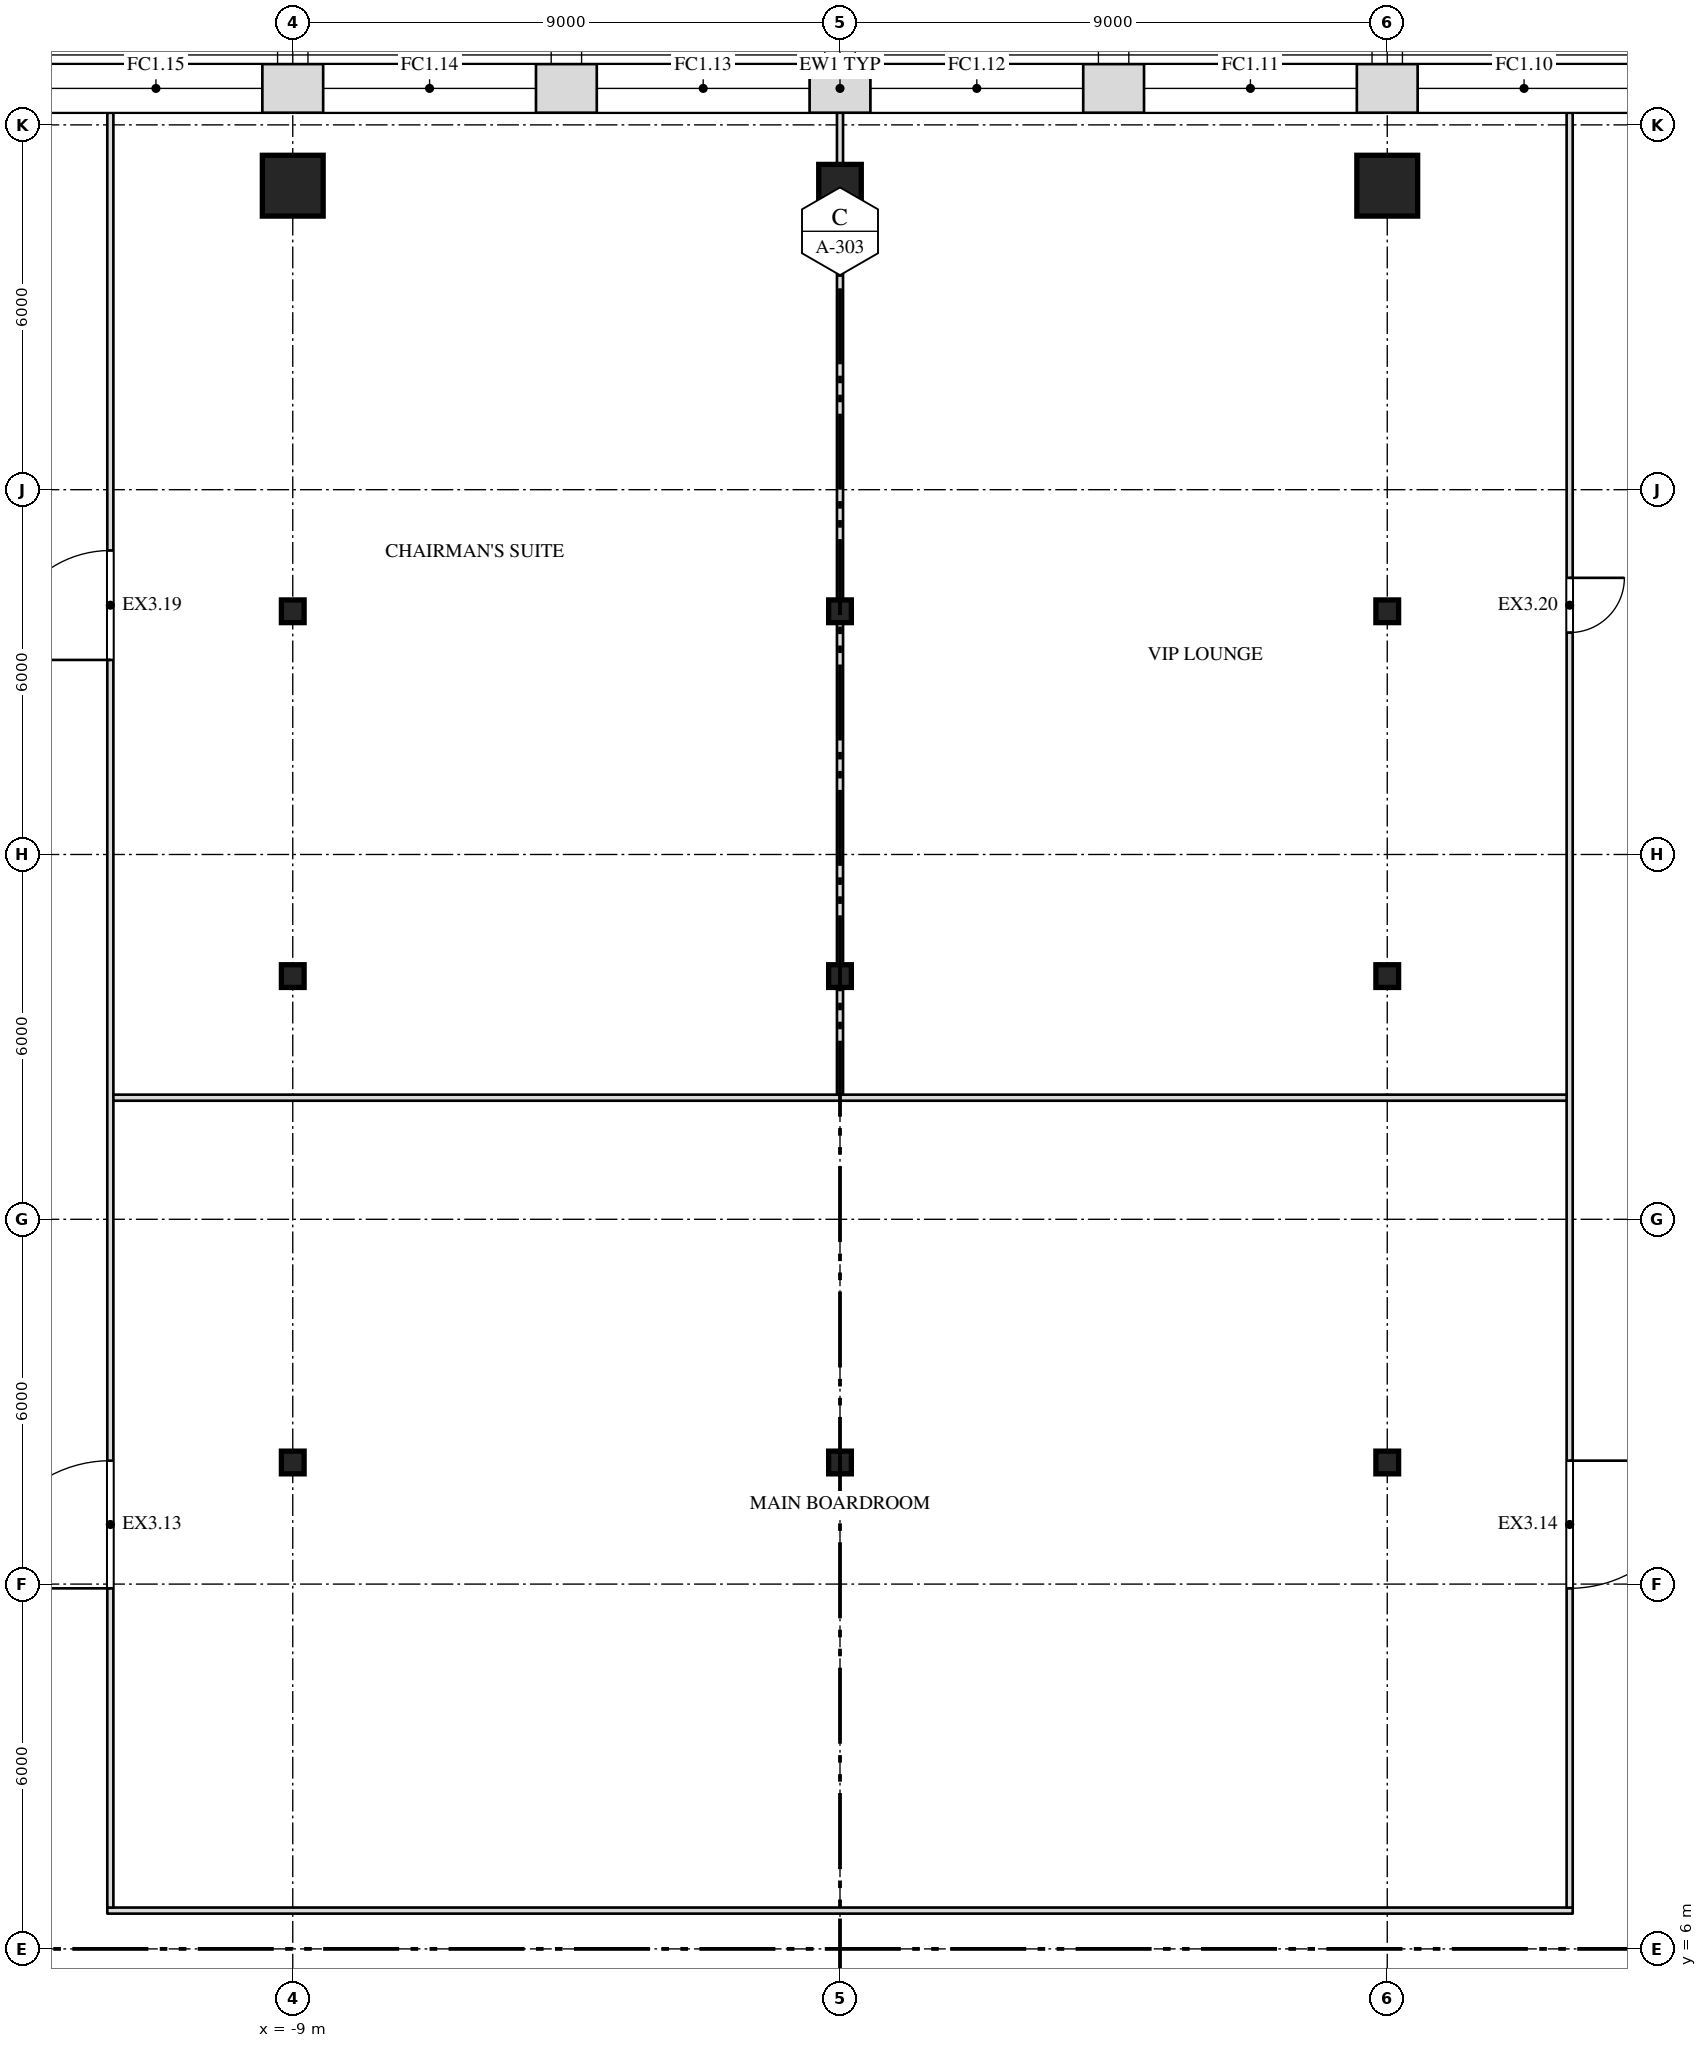
"""IFC4 building model, lengths in metres.
Left out: names, types, materials, properties, quantities, classifications, styles, units other than length and angle.
Written with IfcOpenShell. Run it as: python <this file> out.ifc"""

import sys

from ifc_helpers import new_model, si_unit, direction, frame, frame_2d, origin, origin_2d, place, context, subcontext, project, spatial, rectangle, i_section, extrude, element, fill, save


model = new_model("IFC4")
c1 = context("Model", 3, precision=1e-05, world=origin(), true_north=direction((0.0, 1.0)))
c2 = subcontext(c1, "Body", "Model", "MODEL_VIEW")
j1 = project(units=[si_unit("LENGTHUNIT", "METRE"), si_unit("PLANEANGLEUNIT", "RADIAN")], contexts=[c1])
p1 = place(None, origin())
s1 = spatial("IfcSite", under=j1, at=p1, CompositionType="ELEMENT")
p2 = place(p1, origin())
s2 = spatial("IfcBuilding", under=s1, at=p2, CompositionType="ELEMENT")
p3 = place(p2, frame((0.0, 0.0, 280.5)))
s3 = spatial("IfcBuildingStorey", under=s2, at=p3, CompositionType="ELEMENT", Elevation=280.5)
for number, where, z_axis, x_axis in (
    (1, (-9.0, 14.0, 0.0), (0.0, 0.0, 1.0), (1.0, 0.0, 0.0)),
    (2, (0.0, 14.0, 0.0), (0.0, 0.0, 1.0), (1.0, 0.0, 0.0)),
    (3, (9.0, 14.0, 0.0), (0.0, 0.0, 1.0), (1.0, 0.0, 0.0)),
    (4, (-9.0, 22.0, 0.0), (0.0, 0.0, 1.0), (1.0, 0.0, 0.0)),
    (5, (0.0, 22.0, 0.0), (0.0, 0.0, 1.0), (1.0, 0.0, 0.0)),
    (6, (9.0, 22.0, 0.0), (0.0, 0.0, 1.0), (1.0, 0.0, 0.0)),
    (7, (-9.0, 28.0, 0.0), (0.0, 0.0, 1.0), (1.0, 0.0, 0.0)),
    (8, (0.0, 28.0, 0.0), (0.0, 0.0, 1.0), (1.0, 0.0, 0.0)),
    (9, (9.0, 28.0, 0.0), (0.0, 0.0, 1.0), (1.0, 0.0, 0.0)),
):
    element("IfcColumn", number, at=place(p3, frame(where, z_axis=z_axis, x_axis=x_axis)), inside=s3, PredefinedType="COLUMN", context=c2, shape_type="SweptSolid", body=[
        extrude(i_section(OverallWidth=0.373, OverallDepth=0.373, WebThickness=0.016, FlangeThickness=0.026, at=origin_2d()), origin(), (0.0, 0.0, 1.0), 4.0),
    ])
p4 = place(p3, frame((-9.0, 35.0, 0.0), z_axis=(0.0, 0.0, 1.0), x_axis=(1.0, 0.0, 0.0)))
e10 = element("IfcColumn", 10, at=p4, inside=s3, PredefinedType="COLUMN", context=c2, shape_type="SweptSolid", body=[
    extrude(rectangle(XDim=1.0, YDim=1.0, at=origin_2d()), origin(), (0.0, 0.0, 1.0), 4.0),
])
p5 = place(p3, frame((0.0, 35.0, 0.0), z_axis=(0.0, 0.0, 1.0), x_axis=(1.0, 0.0, 0.0)))
e11 = element("IfcColumn", 11, at=p5, inside=s3, PredefinedType="COLUMN", context=c2, shape_type="SweptSolid", body=[
    extrude(rectangle(XDim=0.7, YDim=0.7, at=origin_2d()), origin(), (0.0, 0.0, 1.0), 4.0),
])
p6 = place(p3, frame((9.0, 35.0, 0.0), z_axis=(0.0, 0.0, 1.0), x_axis=(1.0, 0.0, 0.0)))
e12 = element("IfcColumn", 12, at=p6, inside=s3, PredefinedType="COLUMN", context=c2, shape_type="SweptSolid", body=[
    extrude(rectangle(XDim=1.0, YDim=1.0, at=origin_2d()), origin(), (0.0, 0.0, 1.0), 4.0),
])
p7 = place(p3, frame((-12.05, 6.63, 0.0), z_axis=(0.0, 0.0, 1.0), x_axis=(1.0, 0.0, 0.0)))
e13 = element("IfcWall", 13, at=p7, inside=s3, PredefinedType="PARTITIONING", context=c2, shape_type="SweptSolid", body=[
    extrude(rectangle(XDim=24.1, YDim=0.1, at=frame_2d((12.05, 0.0))), origin(), (0.0, 0.0, 1.0), 3.78),
])
p8 = place(p3, frame((-12.0, 6.68, 0.0), z_axis=(0.0, 0.0, 1.0), x_axis=(0.0, 1.0, 0.0)))
e14 = element("IfcWall", 14, at=p8, inside=s3, PredefinedType="PARTITIONING", context=c2, shape_type="SweptSolid", body=[
    extrude(rectangle(XDim=29.52, YDim=0.1, at=frame_2d((14.76, 0.0))), origin(), (0.0, 0.0, 1.0), 3.78),
])
p9 = place(p8, frame((5.25, 0.0, 0.0)))
e15 = element("IfcOpeningElement", 15, at=p9, cuts=e14, PredefinedType="OPENING", context=c2, shape_type="SweptSolid", body=[
    extrude(rectangle(XDim=2.1, YDim=2.4, at=frame_2d((1.05, 1.2))), frame((0.0, 0.062, 0.0), z_axis=(0.0, -1.0, 0.0), x_axis=(1.0, 0.0, 0.0)), (0.0, 0.0, 1.0), 0.124),
])
p10 = place(p8, frame((20.52, 0.0, 0.0)))
e16 = element("IfcOpeningElement", 16, at=p10, cuts=e14, PredefinedType="OPENING", context=c2, shape_type="SweptSolid", body=[
    extrude(rectangle(XDim=1.8, YDim=2.1, at=frame_2d((0.9, 1.05))), frame((0.0, 0.062, 0.0), z_axis=(0.0, -1.0, 0.0), x_axis=(1.0, 0.0, 0.0)), (0.0, 0.0, 1.0), 0.124),
])
p11 = place(p3, frame((12.0, 6.68, 0.0), z_axis=(0.0, 0.0, 1.0), x_axis=(0.0, 1.0, 0.0)))
e17 = element("IfcWall", 17, at=p11, inside=s3, PredefinedType="PARTITIONING", context=c2, shape_type="SweptSolid", body=[
    extrude(rectangle(XDim=29.52, YDim=0.1, at=frame_2d((14.76, 0.0))), origin(), (0.0, 0.0, 1.0), 3.78),
])
p12 = place(p11, frame((5.25, 0.0, 0.0)))
e18 = element("IfcOpeningElement", 18, at=p12, cuts=e17, PredefinedType="OPENING", context=c2, shape_type="SweptSolid", body=[
    extrude(rectangle(XDim=2.1, YDim=2.4, at=frame_2d((1.05, 1.2))), frame((0.0, 0.062, 0.0), z_axis=(0.0, -1.0, 0.0), x_axis=(1.0, 0.0, 0.0)), (0.0, 0.0, 1.0), 0.124),
])
p13 = place(p11, frame((20.97, 0.0, 0.0)))
e19 = element("IfcOpeningElement", 19, at=p13, cuts=e17, PredefinedType="OPENING", context=c2, shape_type="SweptSolid", body=[
    extrude(rectangle(XDim=0.9, YDim=2.1, at=frame_2d((0.45, 1.05))), frame((0.0, 0.062, 0.0), z_axis=(0.0, -1.0, 0.0), x_axis=(1.0, 0.0, 0.0)), (0.0, 0.0, 1.0), 0.124),
])
p14 = place(p3, frame((-11.95, 20.0, 0.0), z_axis=(0.0, 0.0, 1.0), x_axis=(1.0, 0.0, 0.0)))
e20 = element("IfcWall", 20, at=p14, inside=s3, PredefinedType="PARTITIONING", context=c2, shape_type="SweptSolid", body=[
    extrude(rectangle(XDim=23.9, YDim=0.1, at=frame_2d((11.95, 0.0))), origin(), (0.0, 0.0, 1.0), 3.78),
])
p15 = place(p3, frame((0.0, 20.05, 0.0), z_axis=(0.0, 0.0, 1.0), x_axis=(0.0, 1.0, 0.0)))
e21 = element("IfcWall", 21, at=p15, inside=s3, PredefinedType="PARTITIONING", context=c2, shape_type="SweptSolid", body=[
    extrude(rectangle(XDim=1.763, YDim=0.1, at=frame_2d((0.882, 0.0))), origin(), (0.0, 0.0, 1.0), 2.848),
])
p16 = place(p3, frame((0.0, 22.187, 0.0), z_axis=(0.0, 0.0, 1.0), x_axis=(0.0, 1.0, 0.0)))
e22 = element("IfcWall", 22, at=p16, inside=s3, PredefinedType="PARTITIONING", context=c2, shape_type="SweptSolid", body=[
    extrude(rectangle(XDim=5.626, YDim=0.1, at=frame_2d((2.813, 0.0))), origin(), (0.0, 0.0, 1.0), 2.848),
])
p17 = place(p3, frame((0.0, 28.187, 0.0), z_axis=(0.0, 0.0, 1.0), x_axis=(0.0, 1.0, 0.0)))
e23 = element("IfcWall", 23, at=p17, inside=s3, PredefinedType="PARTITIONING", context=c2, shape_type="SweptSolid", body=[
    extrude(rectangle(XDim=6.463, YDim=0.1, at=frame_2d((3.231, 0.0))), origin(), (0.0, 0.0, 1.0), 2.848),
])
p18 = place(p3, frame((0.0, 35.35, 0.0), z_axis=(0.0, 0.0, 1.0), x_axis=(0.0, 1.0, 0.0)))
e24 = element("IfcWall", 24, at=p18, inside=s3, PredefinedType="PARTITIONING", context=c2, shape_type="SweptSolid", body=[
    extrude(rectangle(XDim=0.85, YDim=0.1, at=frame_2d((0.425, 0.0))), origin(), (0.0, 0.0, 1.0), 3.78),
])
p19 = place(p3, frame((29.948, 36.6, 0.0), z_axis=(0.0, 0.0, 1.0), x_axis=(-1.0, 0.0, 0.0)))
e25 = element("IfcWall", 25, at=p19, inside=s3, PredefinedType="SOLIDWALL", context=c2, shape_type="SweptSolid", body=[
    extrude(rectangle(XDim=59.895, YDim=0.8, at=frame_2d((29.948, 0.0))), origin(), (0.0, 0.0, 1.0), 3.78),
])
p20 = place(p19, frame((3.448, 0.0, 1.0)))
e26 = element("IfcOpeningElement", 26, at=p20, cuts=e25, PredefinedType="OPENING", context=c2, shape_type="SweptSolid", body=[
    extrude(rectangle(XDim=3.5, YDim=2.5, at=frame_2d((1.75, 1.25))), frame((0.0, 0.412, 0.0), z_axis=(0.0, -1.0, 0.0), x_axis=(1.0, 0.0, 0.0)), (0.0, 0.0, 1.0), 0.824),
])
p21 = place(p19, frame((7.948, 0.0, 1.0)))
e27 = element("IfcOpeningElement", 27, at=p21, cuts=e25, PredefinedType="OPENING", context=c2, shape_type="SweptSolid", body=[
    extrude(rectangle(XDim=3.5, YDim=2.5, at=frame_2d((1.75, 1.25))), frame((0.0, 0.412, 0.0), z_axis=(0.0, -1.0, 0.0), x_axis=(1.0, 0.0, 0.0)), (0.0, 0.0, 1.0), 0.824),
])
p22 = place(p19, frame((12.448, 0.0, 1.0)))
e28 = element("IfcOpeningElement", 28, at=p22, cuts=e25, PredefinedType="OPENING", context=c2, shape_type="SweptSolid", body=[
    extrude(rectangle(XDim=3.5, YDim=2.5, at=frame_2d((1.75, 1.25))), frame((0.0, 0.412, 0.0), z_axis=(0.0, -1.0, 0.0), x_axis=(1.0, 0.0, 0.0)), (0.0, 0.0, 1.0), 0.824),
])
p23 = place(p19, frame((16.948, 0.0, 1.0)))
e29 = element("IfcOpeningElement", 29, at=p23, cuts=e25, PredefinedType="OPENING", context=c2, shape_type="SweptSolid", body=[
    extrude(rectangle(XDim=3.5, YDim=2.5, at=frame_2d((1.75, 1.25))), frame((0.0, 0.412, 0.0), z_axis=(0.0, -1.0, 0.0), x_axis=(1.0, 0.0, 0.0)), (0.0, 0.0, 1.0), 0.824),
])
p24 = place(p19, frame((21.448, 0.0, 1.0)))
e30 = element("IfcOpeningElement", 30, at=p24, cuts=e25, PredefinedType="OPENING", context=c2, shape_type="SweptSolid", body=[
    extrude(rectangle(XDim=3.5, YDim=2.5, at=frame_2d((1.75, 1.25))), frame((0.0, 0.412, 0.0), z_axis=(0.0, -1.0, 0.0), x_axis=(1.0, 0.0, 0.0)), (0.0, 0.0, 1.0), 0.824),
])
p25 = place(p19, frame((25.948, 0.0, 1.0)))
e31 = element("IfcOpeningElement", 31, at=p25, cuts=e25, PredefinedType="OPENING", context=c2, shape_type="SweptSolid", body=[
    extrude(rectangle(XDim=3.5, YDim=2.5, at=frame_2d((1.75, 1.25))), frame((0.0, 0.412, 0.0), z_axis=(0.0, -1.0, 0.0), x_axis=(1.0, 0.0, 0.0)), (0.0, 0.0, 1.0), 0.824),
])
p26 = place(p19, frame((30.448, 0.0, 1.0)))
e32 = element("IfcOpeningElement", 32, at=p26, cuts=e25, PredefinedType="OPENING", context=c2, shape_type="SweptSolid", body=[
    extrude(rectangle(XDim=3.5, YDim=2.5, at=frame_2d((1.75, 1.25))), frame((0.0, 0.412, 0.0), z_axis=(0.0, -1.0, 0.0), x_axis=(1.0, 0.0, 0.0)), (0.0, 0.0, 1.0), 0.824),
])
p27 = place(p19, frame((34.948, 0.0, 1.0)))
e33 = element("IfcOpeningElement", 33, at=p27, cuts=e25, PredefinedType="OPENING", context=c2, shape_type="SweptSolid", body=[
    extrude(rectangle(XDim=3.5, YDim=2.5, at=frame_2d((1.75, 1.25))), frame((0.0, 0.412, 0.0), z_axis=(0.0, -1.0, 0.0), x_axis=(1.0, 0.0, 0.0)), (0.0, 0.0, 1.0), 0.824),
])
p28 = place(p19, frame((39.448, 0.0, 1.0)))
e34 = element("IfcOpeningElement", 34, at=p28, cuts=e25, PredefinedType="OPENING", context=c2, shape_type="SweptSolid", body=[
    extrude(rectangle(XDim=3.5, YDim=2.5, at=frame_2d((1.75, 1.25))), frame((0.0, 0.412, 0.0), z_axis=(0.0, -1.0, 0.0), x_axis=(1.0, 0.0, 0.0)), (0.0, 0.0, 1.0), 0.824),
])
p29 = place(p19, frame((43.948, 0.0, 1.0)))
e35 = element("IfcOpeningElement", 35, at=p29, cuts=e25, PredefinedType="OPENING", context=c2, shape_type="SweptSolid", body=[
    extrude(rectangle(XDim=3.5, YDim=2.5, at=frame_2d((1.75, 1.25))), frame((0.0, 0.412, 0.0), z_axis=(0.0, -1.0, 0.0), x_axis=(1.0, 0.0, 0.0)), (0.0, 0.0, 1.0), 0.824),
])
p30 = place(p19, frame((48.448, 0.0, 1.0)))
e36 = element("IfcOpeningElement", 36, at=p30, cuts=e25, PredefinedType="OPENING", context=c2, shape_type="SweptSolid", body=[
    extrude(rectangle(XDim=3.5, YDim=2.5, at=frame_2d((1.75, 1.25))), frame((0.0, 0.412, 0.0), z_axis=(0.0, -1.0, 0.0), x_axis=(1.0, 0.0, 0.0)), (0.0, 0.0, 1.0), 0.824),
])
p31 = place(p19, frame((52.948, 0.0, 1.0)))
e37 = element("IfcOpeningElement", 37, at=p31, cuts=e25, PredefinedType="OPENING", context=c2, shape_type="SweptSolid", body=[
    extrude(rectangle(XDim=3.5, YDim=2.5, at=frame_2d((1.75, 1.25))), frame((0.0, 0.412, 0.0), z_axis=(0.0, -1.0, 0.0), x_axis=(1.0, 0.0, 0.0)), (0.0, 0.0, 1.0), 0.824),
])
p32 = place(p9, origin())
e38 = element("IfcDoor", 38, at=p32, inside=s3, OperationType="DOUBLE_DOOR_SINGLE_SWING", PredefinedType="DOOR", context=c2, shape_type="SweptSolid", body=[
    extrude(rectangle(XDim=2.1, YDim=2.4, at=frame_2d((1.05, 1.2))), frame((0.0, 0.025, 0.0), z_axis=(0.0, -1.0, 0.0), x_axis=(1.0, 0.0, 0.0)), (0.0, 0.0, 1.0), 0.05),
])
fill(e15, e38)
p33 = place(p12, origin())
e39 = element("IfcDoor", 39, at=p33, inside=s3, OperationType="DOUBLE_DOOR_SINGLE_SWING", PredefinedType="DOOR", context=c2, shape_type="SweptSolid", body=[
    extrude(rectangle(XDim=2.1, YDim=2.4, at=frame_2d((1.05, 1.2))), frame((0.0, 0.025, 0.0), z_axis=(0.0, -1.0, 0.0), x_axis=(1.0, 0.0, 0.0)), (0.0, 0.0, 1.0), 0.05),
])
fill(e18, e39)
p34 = place(p10, origin())
e40 = element("IfcDoor", 40, at=p34, inside=s3, OperationType="DOUBLE_DOOR_SINGLE_SWING", PredefinedType="DOOR", context=c2, shape_type="SweptSolid", body=[
    extrude(rectangle(XDim=1.8, YDim=2.1, at=frame_2d((0.9, 1.05))), frame((0.0, 0.025, 0.0), z_axis=(0.0, -1.0, 0.0), x_axis=(1.0, 0.0, 0.0)), (0.0, 0.0, 1.0), 0.05),
])
fill(e16, e40)
p35 = place(p13, origin())
e41 = element("IfcDoor", 41, at=p35, inside=s3, OperationType="SINGLE_SWING_LEFT", PredefinedType="DOOR", context=c2, shape_type="SweptSolid", body=[
    extrude(rectangle(XDim=0.9, YDim=2.1, at=frame_2d((0.45, 1.05))), frame((0.0, 0.025, 0.0), z_axis=(0.0, -1.0, 0.0), x_axis=(1.0, 0.0, 0.0)), (0.0, 0.0, 1.0), 0.05),
])
fill(e19, e41)
p36 = place(p23, origin())
e42 = element("IfcWindow", 42, at=p36, inside=s3, PartitioningType="SINGLE_PANEL", PredefinedType="WINDOW", context=c2, shape_type="SweptSolid", body=[
    extrude(rectangle(XDim=3.5, YDim=2.5, at=frame_2d((1.75, 1.25))), frame((0.0, 0.03, 0.0), z_axis=(0.0, -1.0, 0.0), x_axis=(1.0, 0.0, 0.0)), (0.0, 0.0, 1.0), 0.06),
])
fill(e29, e42)
p37 = place(p24, origin())
e43 = element("IfcWindow", 43, at=p37, inside=s3, PartitioningType="SINGLE_PANEL", PredefinedType="WINDOW", context=c2, shape_type="SweptSolid", body=[
    extrude(rectangle(XDim=3.5, YDim=2.5, at=frame_2d((1.75, 1.25))), frame((0.0, 0.03, 0.0), z_axis=(0.0, -1.0, 0.0), x_axis=(1.0, 0.0, 0.0)), (0.0, 0.0, 1.0), 0.06),
])
fill(e30, e43)
p38 = place(p25, origin())
e44 = element("IfcWindow", 44, at=p38, inside=s3, PartitioningType="SINGLE_PANEL", PredefinedType="WINDOW", context=c2, shape_type="SweptSolid", body=[
    extrude(rectangle(XDim=3.5, YDim=2.5, at=frame_2d((1.75, 1.25))), frame((0.0, 0.03, 0.0), z_axis=(0.0, -1.0, 0.0), x_axis=(1.0, 0.0, 0.0)), (0.0, 0.0, 1.0), 0.06),
])
fill(e31, e44)
p39 = place(p26, origin())
e45 = element("IfcWindow", 45, at=p39, inside=s3, PartitioningType="SINGLE_PANEL", PredefinedType="WINDOW", context=c2, shape_type="SweptSolid", body=[
    extrude(rectangle(XDim=3.5, YDim=2.5, at=frame_2d((1.75, 1.25))), frame((0.0, 0.03, 0.0), z_axis=(0.0, -1.0, 0.0), x_axis=(1.0, 0.0, 0.0)), (0.0, 0.0, 1.0), 0.06),
])
fill(e32, e45)
p40 = place(p27, origin())
e46 = element("IfcWindow", 46, at=p40, inside=s3, PartitioningType="SINGLE_PANEL", PredefinedType="WINDOW", context=c2, shape_type="SweptSolid", body=[
    extrude(rectangle(XDim=3.5, YDim=2.5, at=frame_2d((1.75, 1.25))), frame((0.0, 0.03, 0.0), z_axis=(0.0, -1.0, 0.0), x_axis=(1.0, 0.0, 0.0)), (0.0, 0.0, 1.0), 0.06),
])
fill(e33, e46)
p41 = place(p28, origin())
e47 = element("IfcWindow", 47, at=p41, inside=s3, PartitioningType="SINGLE_PANEL", PredefinedType="WINDOW", context=c2, shape_type="SweptSolid", body=[
    extrude(rectangle(XDim=3.5, YDim=2.5, at=frame_2d((1.75, 1.25))), frame((0.0, 0.03, 0.0), z_axis=(0.0, -1.0, 0.0), x_axis=(1.0, 0.0, 0.0)), (0.0, 0.0, 1.0), 0.06),
])
fill(e34, e47)
save(model, sys.argv[1])
